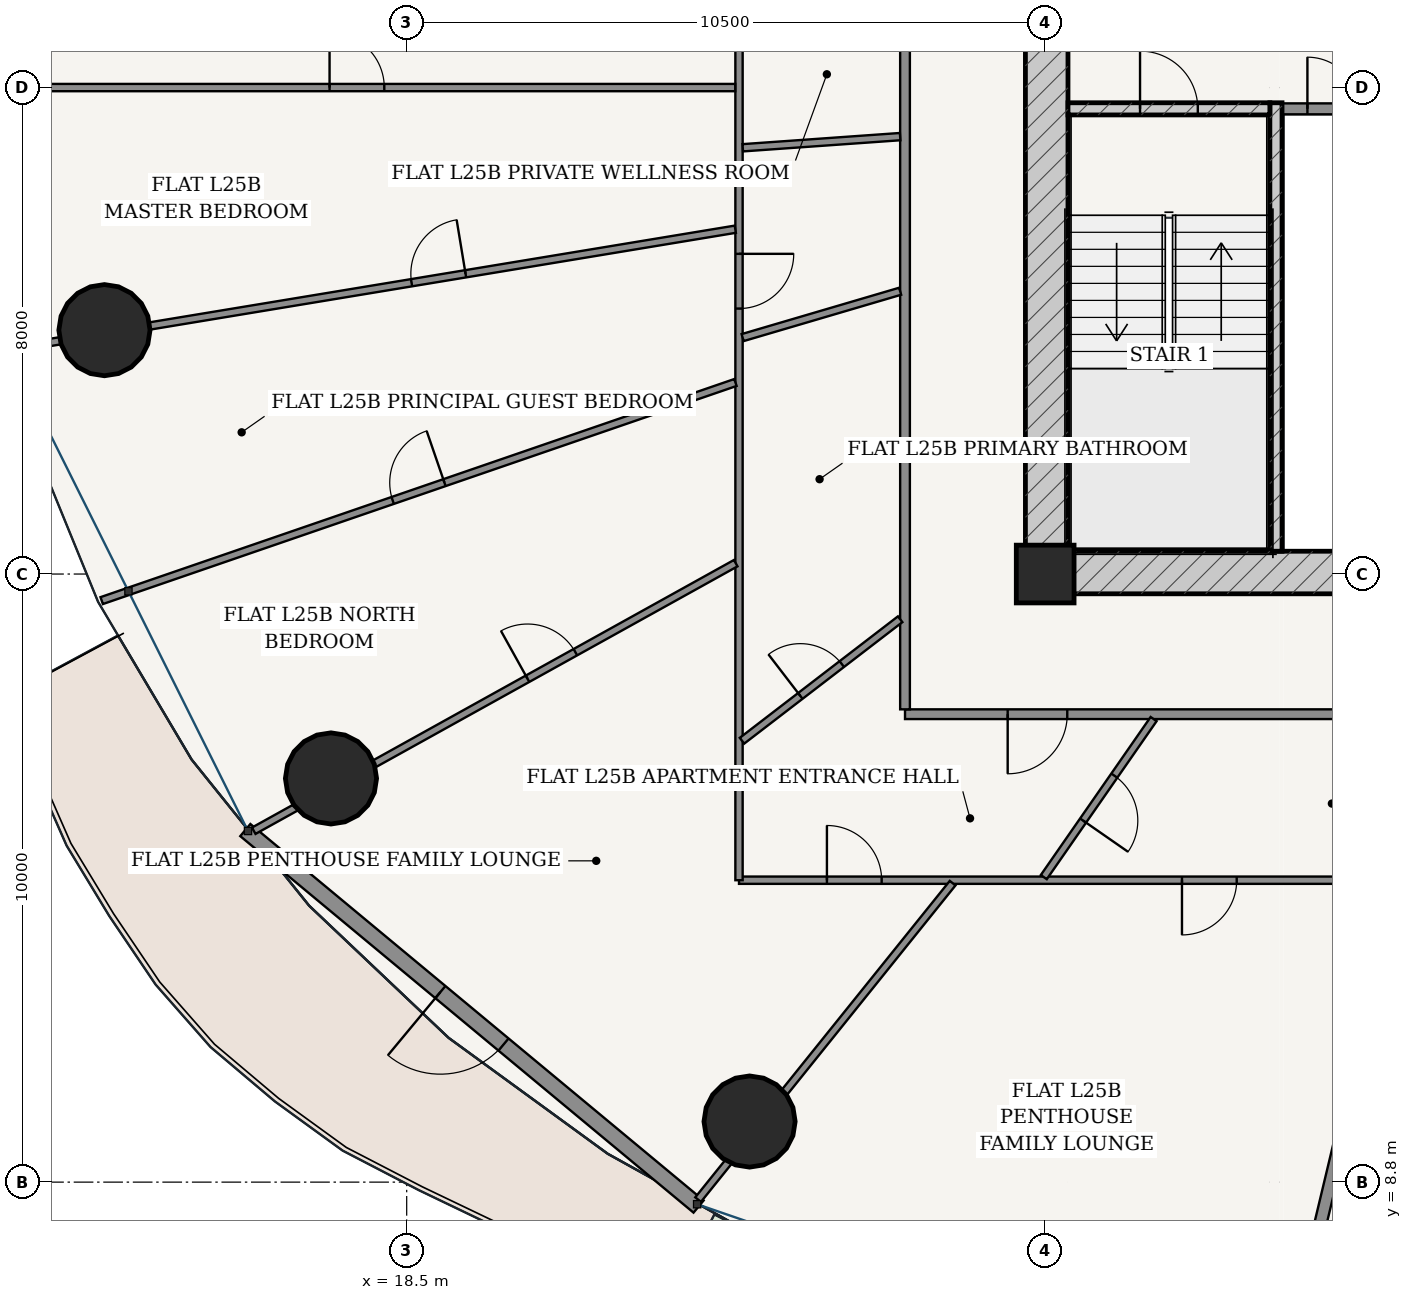
"""IFC4 building model, lengths in metres.
Left out: names, types, materials, properties, quantities, classifications, styles, units other than length and angle.
Written with IfcOpenShell. Run it as: python <this file> out.ifc"""

import sys

from ifc_helpers import new_model, si_unit, direction, frame, frame_2d, origin, origin_2d, place, context, subcontext, project, spatial, rectangle, hollow_circle, extrude, source, transform, mapped, element, fill, save


model = new_model("IFC4")
c1 = context("Model", 3, precision=1e-05, world=origin(), true_north=direction((-0.2419218956, 0.970295726276)))
c2 = subcontext(c1, "Body", "Model", "MODEL_VIEW")
j1 = project(units=[si_unit("LENGTHUNIT", "METRE"), si_unit("PLANEANGLEUNIT", "RADIAN")], contexts=[c1])
p1 = place(None, origin())
s1 = spatial("IfcSite", under=j1, at=p1, CompositionType="ELEMENT")
p2 = place(p1, origin())
s2 = spatial("IfcBuilding", under=s1, at=p2, CompositionType="ELEMENT")
p3 = place(p2, frame((0.0, 0.0, 97.8)))
s3 = spatial("IfcBuildingStorey", under=s2, at=p3, CompositionType="ELEMENT", Elevation=97.8)
p4 = place(p3, frame((29.0, 18.8, 0.0), z_axis=(0.0, 0.0, 1.0), x_axis=(1.0, 0.0, 0.0)))
e1 = element("IfcColumn", 1, at=p4, inside=s3, PredefinedType="COLUMN", context=c2, shape_type="SweptSolid", body=[
    extrude(rectangle(XDim=0.95, YDim=0.95, at=origin_2d()), origin(), (0.0, 0.0, 1.0), 3.6),
])
p5 = place(p3, frame((28.675, 18.825, 0.0), z_axis=(0.0, 0.0, 1.0), x_axis=(1.0, 0.0, 0.0)))
e2 = element("IfcWall", 2, at=p5, inside=s3, PredefinedType="SHEAR", context=c2, shape_type="SweptSolid", body=[
    extrude(rectangle(XDim=18.65, YDim=0.7, at=frame_2d((9.325, 0.0))), origin(), (0.0, 0.0, 1.0), 3.325),
])
p6 = place(p5, frame((8.9, 0.0, 0.0)))
e3 = element("IfcOpeningElement", 3, at=p6, cuts=e2, PredefinedType="OPENING", context=c2, shape_type="SweptSolid", body=[
    extrude(rectangle(XDim=0.85, YDim=2.1, at=frame_2d((0.425, 1.05))), frame((0.0, 0.36, 0.0), z_axis=(0.0, -1.0, 0.0), x_axis=(1.0, 0.0, 0.0)), (0.0, 0.0, 1.0), 0.72),
])
p7 = place(p3, frame((29.025, 19.175, 0.0), z_axis=(0.0, 0.0, 1.0), x_axis=(0.0, 1.0, 0.0)))
e4 = element("IfcWall", 4, at=p7, inside=s3, PredefinedType="SHEAR", context=c2, shape_type="SweptSolid", body=[
    extrude(rectangle(XDim=15.25, YDim=0.7, at=frame_2d((7.625, 0.0))), origin(), (0.0, 0.0, 1.0), 3.325),
])
p8 = place(p7, frame((9.875, 0.0, 0.0)))
e5 = element("IfcOpeningElement", 5, at=p8, cuts=e4, PredefinedType="OPENING", context=c2, shape_type="SweptSolid", body=[
    extrude(rectangle(XDim=1.5, YDim=2.2, at=frame_2d((0.75, 1.1))), frame((0.0, 0.36, 0.0), z_axis=(0.0, -1.0, 0.0), x_axis=(1.0, 0.0, 0.0)), (0.0, 0.0, 1.0), 0.72),
])
p9 = place(p3, frame((32.795, 19.175, 0.0), z_axis=(0.0, 0.0, 1.0), x_axis=(0.0, 1.0, 0.0)))
e6 = element("IfcWall", 6, at=p9, inside=s3, PredefinedType="SOLIDWALL", context=c2, shape_type="SweptSolid", body=[
    extrude(rectangle(XDim=7.375, YDim=0.2, at=frame_2d((3.688, 0.0))), origin(), (0.0, 0.0, 1.0), 3.325),
])
p10 = place(p3, frame((29.375, 26.45, 0.0), z_axis=(0.0, 0.0, 1.0), x_axis=(1.0, 0.0, 0.0)))
e7 = element("IfcWall", 7, at=p10, inside=s3, PredefinedType="SOLIDWALL", context=c2, shape_type="SweptSolid", body=[
    extrude(rectangle(XDim=3.32, YDim=0.2, at=frame_2d((1.66, 0.0))), origin(), (0.0, 0.0, 1.0), 3.325),
])
p11 = place(p10, frame((1.185, 0.0, 0.0)))
e8 = element("IfcOpeningElement", 8, at=p11, cuts=e7, PredefinedType="OPENING", context=c2, shape_type="SweptSolid", body=[
    extrude(rectangle(XDim=0.95, YDim=2.15, at=frame_2d((0.475, 1.075))), frame((0.0, 0.11, 0.0), z_axis=(0.0, -1.0, 0.0), x_axis=(1.0, 0.0, 0.0)), (0.0, 0.0, 1.0), 0.22),
])
for number, where, z_axis, x_axis in (
    (9, (13.529, 22.81, 0.0), (0.0, 0.0, 1.0), (1.0, 0.0, 0.0)),
    (10, (17.255, 15.438, 0.0), (0.0, 0.0, 1.0), (1.0, 0.0, 0.0)),
    (11, (24.138, 9.796, 0.0), (0.0, 0.0, 1.0), (1.0, 0.0, 0.0)),
):
    element("IfcColumn", number, at=place(p3, frame(where, z_axis=z_axis, x_axis=x_axis)), inside=s3, PredefinedType="COLUMN", context=c2, shape_type="SweptSolid", body=[
        extrude(hollow_circle(Radius=0.75, WallThickness=0.045, at=origin_2d()), origin(), (0.0, 0.0, 1.0), 3.6),
    ])
p12 = place(p3, frame((15.846, 14.59, 0.0), z_axis=(0.0, 0.0, 1.0), x_axis=(0.769254958887, -0.638941944333, 0.0)))
e12 = element("IfcWall", 12, at=p12, inside=s3, PredefinedType="SOLIDWALL", context=c2, shape_type="SweptSolid", body=[
    extrude(rectangle(XDim=9.69, YDim=0.26, at=frame_2d((4.845, 0.0))), origin(), (0.0, 0.0, 1.0), 3.325),
])
p13 = place(p12, frame((4.17, 0.0, 0.0)))
e13 = element("IfcOpeningElement", 13, at=p13, cuts=e12, PredefinedType="OPENING", context=c2, shape_type="SweptSolid", body=[
    extrude(rectangle(XDim=1.35, YDim=2.2, at=frame_2d((0.675, 1.1))), frame((0.0, 0.14, 0.0), z_axis=(0.0, -1.0, 0.0), x_axis=(1.0, 0.0, 0.0)), (0.0, 0.0, 1.0), 0.28),
])
p14 = place(p3, frame((32.9, 26.45, 0.0), z_axis=(0.0, 0.0, 1.0), x_axis=(1.0, 0.0, 0.0)))
e14 = element("IfcWall", 14, at=p14, inside=s3, PredefinedType="PARTITIONING", context=c2, shape_type="SweptSolid", body=[
    extrude(rectangle(XDim=1.675, YDim=0.18, at=frame_2d((0.837, 0.0))), origin(), (0.0, 0.0, 1.0), 3.325),
])
p15 = place(p14, frame((0.413, 0.0, 0.0)))
e15 = element("IfcOpeningElement", 15, at=p15, cuts=e14, PredefinedType="OPENING", context=c2, shape_type="SweptSolid", body=[
    extrude(rectangle(XDim=0.85, YDim=2.1, at=frame_2d((0.425, 1.05))), frame((0.0, 0.1, 0.0), z_axis=(0.0, -1.0, 0.0), x_axis=(1.0, 0.0, 0.0)), (0.0, 0.0, 1.0), 0.2),
])
p16 = place(p3, frame((26.695, 16.495, 0.0), z_axis=(0.0, 0.0, 1.0), x_axis=(1.0, 0.0, 0.0)))
e16 = element("IfcWall", 16, at=p16, inside=s3, PredefinedType="PARTITIONING", context=c2, shape_type="SweptSolid", body=[
    extrude(rectangle(XDim=22.61, YDim=0.16, at=frame_2d((11.305, 0.0))), origin(), (0.0, 0.0, 1.0), 2.767),
])
p17 = place(p16, frame((1.688, 0.0, 0.0)))
e17 = element("IfcOpeningElement", 17, at=p17, cuts=e16, PredefinedType="OPENING", context=c2, shape_type="SweptSolid", body=[
    extrude(rectangle(XDim=0.98, YDim=2.2, at=frame_2d((0.49, 1.1))), frame((0.0, 0.09, 0.0), z_axis=(0.0, -1.0, 0.0), x_axis=(1.0, 0.0, 0.0)), (0.0, 0.0, 1.0), 0.18),
])
p18 = place(p16, frame((16.137, 0.0, 0.0)))
e18 = element("IfcOpeningElement", 18, at=p18, cuts=e16, PredefinedType="OPENING", context=c2, shape_type="SweptSolid", body=[
    extrude(rectangle(XDim=0.98, YDim=2.2, at=frame_2d((0.49, 1.1))), frame((0.0, 0.09, 0.0), z_axis=(0.0, -1.0, 0.0), x_axis=(1.0, 0.0, 0.0)), (0.0, 0.0, 1.0), 0.18),
])
p19 = place(p3, frame((26.695, 16.575, 0.0), z_axis=(0.0, 0.0, 1.0), x_axis=(0.0, 1.0, 0.0)))
e19 = element("IfcWall", 19, at=p19, inside=s3, PredefinedType="PARTITIONING", context=c2, shape_type="SweptSolid", body=[
    extrude(rectangle(XDim=20.45, YDim=0.16, at=frame_2d((10.225, 0.0))), origin(), (0.0, 0.0, 1.0), 2.767),
])
p20 = place(p3, frame((34.777, 13.765, 0.0), z_axis=(0.0, 0.0, 1.0), x_axis=(-1.0, 0.0, 0.0)))
e20 = element("IfcWall", 20, at=p20, inside=s3, PredefinedType="PARTITIONING", context=c2, shape_type="SweptSolid", body=[
    extrude(rectangle(XDim=10.812, YDim=0.12, at=frame_2d((5.406, 0.0))), origin(), (0.0, 0.0, 1.0), 2.767),
])
p21 = place(p20, frame((8.466, 0.0, 0.0)))
e21 = element("IfcOpeningElement", 21, at=p21, cuts=e20, PredefinedType="OPENING", context=c2, shape_type="SweptSolid", body=[
    extrude(rectangle(XDim=0.9, YDim=2.15, at=frame_2d((0.45, 1.075))), frame((0.0, 0.07, 0.0), z_axis=(0.0, -1.0, 0.0), x_axis=(1.0, 0.0, 0.0)), (0.0, 0.0, 1.0), 0.14),
])
p22 = place(p20, frame((2.628, 0.0, 0.0)))
e22 = element("IfcOpeningElement", 22, at=p22, cuts=e20, PredefinedType="OPENING", context=c2, shape_type="SweptSolid", body=[
    extrude(rectangle(XDim=0.9, YDim=2.15, at=frame_2d((0.45, 1.075))), frame((0.0, 0.07, 0.0), z_axis=(0.0, -1.0, 0.0), x_axis=(1.0, 0.0, 0.0)), (0.0, 0.0, 1.0), 0.14),
])
p23 = place(p3, frame((23.965, 13.765, 0.0), z_axis=(0.0, 0.0, 1.0), x_axis=(0.0, 1.0, 0.0)))
e23 = element("IfcWall", 23, at=p23, inside=s3, PredefinedType="PARTITIONING", context=c2, shape_type="SweptSolid", body=[
    extrude(rectangle(XDim=20.725, YDim=0.12, at=frame_2d((10.362, 0.0))), origin(), (0.0, 0.0, 1.0), 2.767),
])
p24 = place(p23, frame((9.401, 0.0, 0.0)))
e24 = element("IfcOpeningElement", 24, at=p24, cuts=e23, PredefinedType="OPENING", context=c2, shape_type="SweptSolid", body=[
    extrude(rectangle(XDim=0.9, YDim=2.15, at=frame_2d((0.45, 1.075))), frame((0.0, 0.07, 0.0), z_axis=(0.0, -1.0, 0.0), x_axis=(1.0, 0.0, 0.0)), (0.0, 0.0, 1.0), 0.14),
])
p25 = place(p23, frame((18.157, 0.0, 0.0)))
e25 = element("IfcOpeningElement", 25, at=p25, cuts=e23, PredefinedType="OPENING", context=c2, shape_type="SweptSolid", body=[
    extrude(rectangle(XDim=0.86, YDim=2.15, at=frame_2d((0.43, 1.075))), frame((0.0, 0.07, 0.0), z_axis=(0.0, -1.0, 0.0), x_axis=(1.0, 0.0, 0.0)), (0.0, 0.0, 1.0), 0.14),
])
p26 = place(p23, frame((14.376, 0.0, 0.0)))
e26 = element("IfcOpeningElement", 26, at=p26, cuts=e23, PredefinedType="OPENING", context=c2, shape_type="SweptSolid", body=[
    extrude(rectangle(XDim=0.9, YDim=2.15, at=frame_2d((0.45, 1.075))), frame((0.0, 0.07, 0.0), z_axis=(0.0, -1.0, 0.0), x_axis=(1.0, 0.0, 0.0)), (0.0, 0.0, 1.0), 0.14),
])
p27 = place(p3, frame((23.903, 26.8, 0.0), z_axis=(0.0, 0.0, 1.0), x_axis=(-1.0, 0.0, 0.0)))
e27 = element("IfcWall", 27, at=p27, inside=s3, PredefinedType="PARTITIONING", context=c2, shape_type="SweptSolid", body=[
    extrude(rectangle(XDim=12.443, YDim=0.12, at=frame_2d((6.222, 0.0))), origin(), (0.0, 0.0, 1.0), 2.767),
])
p28 = place(p27, frame((5.771, 0.0, 0.0)))
e28 = element("IfcOpeningElement", 28, at=p28, cuts=e27, PredefinedType="OPENING", context=c2, shape_type="SweptSolid", body=[
    extrude(rectangle(XDim=0.9, YDim=2.15, at=frame_2d((0.45, 1.075))), frame((0.0, 0.07, 0.0), z_axis=(0.0, -1.0, 0.0), x_axis=(1.0, 0.0, 0.0)), (0.0, 0.0, 1.0), 0.14),
])
p29 = place(p3, frame((23.904, 24.47, 0.0), z_axis=(0.0, 0.0, 1.0), x_axis=(-0.986618264768, -0.163047231274, 0.0)))
e29 = element("IfcWall", 29, at=p29, inside=s3, PredefinedType="PARTITIONING", context=c2, shape_type="SweptSolid", body=[
    extrude(rectangle(XDim=12.039, YDim=0.12, at=frame_2d((6.02, 0.0))), origin(), (0.0, 0.0, 1.0), 2.767),
])
p30 = place(p29, frame((4.496, 0.0, 0.0)))
e30 = element("IfcOpeningElement", 30, at=p30, cuts=e29, PredefinedType="OPENING", context=c2, shape_type="SweptSolid", body=[
    extrude(rectangle(XDim=0.9, YDim=2.15, at=frame_2d((0.45, 1.075))), frame((0.0, 0.07, 0.0), z_axis=(0.0, -1.0, 0.0), x_axis=(1.0, 0.0, 0.0)), (0.0, 0.0, 1.0), 0.14),
])
p31 = place(p3, frame((23.906, 21.95, 0.0), z_axis=(0.0, 0.0, 1.0), x_axis=(-0.945573120726, -0.32540970078, 0.0)))
e31 = element("IfcWall", 31, at=p31, inside=s3, PredefinedType="PARTITIONING", context=c2, shape_type="SweptSolid", body=[
    extrude(rectangle(XDim=11.022, YDim=0.12, at=frame_2d((5.511, 0.0))), origin(), (0.0, 0.0, 1.0), 2.767),
])
p32 = place(p31, frame((5.061, 0.0, 0.0)))
e32 = element("IfcOpeningElement", 32, at=p32, cuts=e31, PredefinedType="OPENING", context=c2, shape_type="SweptSolid", body=[
    extrude(rectangle(XDim=0.9, YDim=2.15, at=frame_2d((0.45, 1.075))), frame((0.0, 0.07, 0.0), z_axis=(0.0, -1.0, 0.0), x_axis=(1.0, 0.0, 0.0)), (0.0, 0.0, 1.0), 0.14),
])
p33 = place(p3, frame((23.911, 18.979, 0.0), z_axis=(0.0, 0.0, 1.0), x_axis=(-0.874313476423, -0.485361664066, 0.0)))
e33 = element("IfcWall", 33, at=p33, inside=s3, PredefinedType="PARTITIONING", context=c2, shape_type="SweptSolid", body=[
    extrude(rectangle(XDim=9.066, YDim=0.12, at=frame_2d((4.533, 0.0))), origin(), (0.0, 0.0, 1.0), 2.767),
])
p34 = place(p33, frame((3.016, 0.0, 0.0)))
e34 = element("IfcOpeningElement", 34, at=p34, cuts=e33, PredefinedType="OPENING", context=c2, shape_type="SweptSolid", body=[
    extrude(rectangle(XDim=0.9, YDim=2.15, at=frame_2d((0.45, 1.075))), frame((0.0, 0.07, 0.0), z_axis=(0.0, -1.0, 0.0), x_axis=(1.0, 0.0, 0.0)), (0.0, 0.0, 1.0), 0.14),
])
p35 = place(p3, frame((27.478, 13.717, 0.0), z_axis=(0.0, 0.0, 1.0), x_axis=(-0.626707979732, -0.77925419995, 0.0)))
e35 = element("IfcWall", 35, at=p35, inside=s3, PredefinedType="PARTITIONING", context=c2, shape_type="SweptSolid", body=[
    extrude(rectangle(XDim=6.679, YDim=0.12, at=frame_2d((3.339, 0.0))), origin(), (0.0, 0.0, 1.0), 2.767),
])
p36 = place(p3, frame((26.615, 25.993, 0.0), z_axis=(0.0, 0.0, 1.0), x_axis=(-0.997500084777, -0.070665273433, 0.0)))
e36 = element("IfcWall", 36, at=p36, inside=s3, PredefinedType="PARTITIONING", context=c2, shape_type="SweptSolid", body=[
    extrude(rectangle(XDim=2.595, YDim=0.12, at=frame_2d((1.297, 0.0))), origin(), (0.0, 0.0, 1.0), 3.325),
])
p37 = place(p3, frame((26.615, 23.45, 0.0), z_axis=(0.0, 0.0, 1.0), x_axis=(-0.959338143787, -0.282259323806, 0.0)))
e37 = element("IfcWall", 37, at=p37, inside=s3, PredefinedType="PARTITIONING", context=c2, shape_type="SweptSolid", body=[
    extrude(rectangle(XDim=2.7, YDim=0.12, at=frame_2d((1.35, 0.0))), origin(), (0.0, 0.0, 1.0), 3.325),
])
p38 = place(p3, frame((26.615, 18.056, 0.0), z_axis=(0.0, 0.0, 1.0), x_axis=(-0.79311360735, -0.609073727751, 0.0)))
e38 = element("IfcWall", 38, at=p38, inside=s3, PredefinedType="PARTITIONING", context=c2, shape_type="SweptSolid", body=[
    extrude(rectangle(XDim=3.279, YDim=0.12, at=frame_2d((1.64, 0.0))), origin(), (0.0, 0.0, 1.0), 3.004),
])
p39 = place(p38, frame((1.21, 0.0, 0.0)))
e39 = element("IfcOpeningElement", 39, at=p39, cuts=e38, PredefinedType="OPENING", context=c2, shape_type="SweptSolid", body=[
    extrude(rectangle(XDim=0.86, YDim=2.15, at=frame_2d((0.43, 1.075))), frame((0.0, 0.07, 0.0), z_axis=(0.0, -1.0, 0.0), x_axis=(1.0, 0.0, 0.0)), (0.0, 0.0, 1.0), 0.14),
])
p40 = place(p3, frame((30.783, 16.415, 0.0), z_axis=(0.0, 0.0, 1.0), x_axis=(-0.570653089326, -0.821191239385, 0.0)))
e40 = element("IfcWall", 40, at=p40, inside=s3, PredefinedType="PARTITIONING", context=c2, shape_type="SweptSolid", body=[
    extrude(rectangle(XDim=3.165, YDim=0.12, at=frame_2d((1.583, 0.0))), origin(), (0.0, 0.0, 1.0), 3.004),
])
p41 = place(p40, frame((1.133, 0.0, 0.0)))
e41 = element("IfcOpeningElement", 41, at=p41, cuts=e40, PredefinedType="OPENING", context=c2, shape_type="SweptSolid", body=[
    extrude(rectangle(XDim=0.9, YDim=2.15, at=frame_2d((0.45, 1.075))), frame((0.0, 0.07, 0.0), z_axis=(0.0, -1.0, 0.0), x_axis=(1.0, 0.0, 0.0)), (0.0, 0.0, 1.0), 0.14),
])
p42 = place(p3, frame((35.514, 16.415, 0.0), z_axis=(0.0, 0.0, 1.0), x_axis=(-0.232829417917, -0.972517589636, 0.0)))
e42 = element("IfcWall", 42, at=p42, inside=s3, PredefinedType="PARTITIONING", context=c2, shape_type="SweptSolid", body=[
    extrude(rectangle(XDim=11.502, YDim=0.2, at=frame_2d((5.751, 0.0))), origin(), (0.0, 0.0, 1.0), 2.767),
])
m1 = source(origin(), c2, "Body", "SweptSolid", [
    extrude(rectangle(XDim=1.35, YDim=2.2, at=frame_2d((0.675, 1.1))), frame((0.0, 0.025, 0.0), z_axis=(0.0, -1.0, 0.0), x_axis=(1.0, 0.0, 0.0)), (0.0, 0.0, 1.0), 0.05),
])
p43 = place(p13, frame((1.35, 0.0, 0.0), z_axis=(0.0, 0.0, 1.0), x_axis=(-1.0, 0.0, 0.0)))
e43 = element("IfcDoor", 43, at=p43, inside=s3, OperationType="SINGLE_SWING_RIGHT", PredefinedType="DOOR", context=c2, shape_type="MappedRepresentation", body=[
    mapped(m1, transform((0.0, 0.0, 0.0), scale=1.0)),
])
fill(e13, e43)
m2 = source(origin(), c2, "Body", "SweptSolid", [
    extrude(rectangle(XDim=0.95, YDim=2.15, at=frame_2d((0.475, 1.075))), frame((0.0, 0.025, 0.0), z_axis=(0.0, -1.0, 0.0), x_axis=(1.0, 0.0, 0.0)), (0.0, 0.0, 1.0), 0.05),
])
p44 = place(p11, origin())
e44 = element("IfcDoor", 44, at=p44, inside=s3, OperationType="SINGLE_SWING_LEFT", PredefinedType="DOOR", context=c2, shape_type="MappedRepresentation", body=[
    mapped(m2, transform((0.0, 0.0, 0.0), scale=1.0)),
])
fill(e8, e44)
m3 = source(origin(), c2, "Body", "SweptSolid", [
    extrude(rectangle(XDim=0.85, YDim=2.1, at=frame_2d((0.425, 1.05))), frame((0.0, 0.025, 0.0), z_axis=(0.0, -1.0, 0.0), x_axis=(1.0, 0.0, 0.0)), (0.0, 0.0, 1.0), 0.05),
])
p45 = place(p15, origin())
e45 = element("IfcDoor", 45, at=p45, inside=s3, OperationType="SINGLE_SWING_LEFT", PredefinedType="DOOR", context=c2, shape_type="MappedRepresentation", body=[
    mapped(m3, transform((0.0, 0.0, 0.0), scale=1.0)),
])
fill(e15, e45)
m4 = source(origin(), c2, "Body", "SweptSolid", [
    extrude(rectangle(XDim=0.98, YDim=2.2, at=frame_2d((0.49, 1.1))), frame((0.0, 0.025, 0.0), z_axis=(0.0, -1.0, 0.0), x_axis=(1.0, 0.0, 0.0)), (0.0, 0.0, 1.0), 0.05),
])
p46 = place(p17, frame((0.98, 0.0, 0.0), z_axis=(0.0, 0.0, 1.0), x_axis=(-1.0, 0.0, 0.0)))
e46 = element("IfcDoor", 46, at=p46, inside=s3, OperationType="SINGLE_SWING_RIGHT", PredefinedType="DOOR", context=c2, shape_type="MappedRepresentation", body=[
    mapped(m4, transform((0.0, 0.0, 0.0), scale=1.0)),
])
fill(e17, e46)
m5 = source(origin(), c2, "Body", "SweptSolid", [
    extrude(rectangle(XDim=0.86, YDim=2.15, at=frame_2d((0.43, 1.075))), frame((0.0, 0.025, 0.0), z_axis=(0.0, -1.0, 0.0), x_axis=(1.0, 0.0, 0.0)), (0.0, 0.0, 1.0), 0.05),
])
p47 = place(p39, frame((0.86, 0.0, 0.0), z_axis=(0.0, 0.0, 1.0), x_axis=(-1.0, 0.0, 0.0)))
e47 = element("IfcDoor", 47, at=p47, inside=s3, OperationType="SINGLE_SWING_LEFT", PredefinedType="DOOR", context=c2, shape_type="MappedRepresentation", body=[
    mapped(m5, transform((0.0, 0.0, 0.0), scale=1.0)),
])
fill(e39, e47)
m6 = source(origin(), c2, "Body", "SweptSolid", [
    extrude(rectangle(XDim=0.9, YDim=2.15, at=frame_2d((0.45, 1.075))), frame((0.0, 0.025, 0.0), z_axis=(0.0, -1.0, 0.0), x_axis=(1.0, 0.0, 0.0)), (0.0, 0.0, 1.0), 0.05),
])
p48 = place(p41, origin())
e48 = element("IfcDoor", 48, at=p48, inside=s3, OperationType="SINGLE_SWING_RIGHT", PredefinedType="DOOR", context=c2, shape_type="MappedRepresentation", body=[
    mapped(m6, transform((0.0, 0.0, 0.0), scale=1.0)),
])
fill(e41, e48)
p49 = place(p21, frame((0.9, 0.0, 0.0), z_axis=(0.0, 0.0, 1.0), x_axis=(-1.0, 0.0, 0.0)))
e49 = element("IfcDoor", 49, at=p49, inside=s3, OperationType="SINGLE_SWING_LEFT", PredefinedType="DOOR", context=c2, shape_type="MappedRepresentation", body=[
    mapped(m6, transform((0.0, 0.0, 0.0), scale=1.0)),
])
fill(e21, e49)
p50 = place(p22, origin())
e50 = element("IfcDoor", 50, at=p50, inside=s3, OperationType="SINGLE_SWING_RIGHT", PredefinedType="DOOR", context=c2, shape_type="MappedRepresentation", body=[
    mapped(m6, transform((0.0, 0.0, 0.0), scale=1.0)),
])
fill(e22, e50)
p51 = place(p34, frame((0.9, 0.0, 0.0), z_axis=(0.0, 0.0, 1.0), x_axis=(-1.0, 0.0, 0.0)))
e51 = element("IfcDoor", 51, at=p51, inside=s3, OperationType="SINGLE_SWING_LEFT", PredefinedType="DOOR", context=c2, shape_type="MappedRepresentation", body=[
    mapped(m6, transform((0.0, 0.0, 0.0), scale=1.0)),
])
fill(e34, e51)
p52 = place(p32, frame((0.9, 0.0, 0.0), z_axis=(0.0, 0.0, 1.0), x_axis=(-1.0, 0.0, 0.0)))
e52 = element("IfcDoor", 52, at=p52, inside=s3, OperationType="SINGLE_SWING_RIGHT", PredefinedType="DOOR", context=c2, shape_type="MappedRepresentation", body=[
    mapped(m6, transform((0.0, 0.0, 0.0), scale=1.0)),
])
fill(e32, e52)
p53 = place(p24, frame((0.9, 0.0, 0.0), z_axis=(0.0, 0.0, 1.0), x_axis=(-1.0, 0.0, 0.0)))
e53 = element("IfcDoor", 53, at=p53, inside=s3, OperationType="SINGLE_SWING_LEFT", PredefinedType="DOOR", context=c2, shape_type="MappedRepresentation", body=[
    mapped(m6, transform((0.0, 0.0, 0.0), scale=1.0)),
])
fill(e24, e53)
p54 = place(p30, frame((0.9, 0.0, 0.0), z_axis=(0.0, 0.0, 1.0), x_axis=(-1.0, 0.0, 0.0)))
e54 = element("IfcDoor", 54, at=p54, inside=s3, OperationType="SINGLE_SWING_RIGHT", PredefinedType="DOOR", context=c2, shape_type="MappedRepresentation", body=[
    mapped(m6, transform((0.0, 0.0, 0.0), scale=1.0)),
])
fill(e30, e54)
p55 = place(p28, frame((0.9, 0.0, 0.0), z_axis=(0.0, 0.0, 1.0), x_axis=(-1.0, 0.0, 0.0)))
e55 = element("IfcDoor", 55, at=p55, inside=s3, OperationType="SINGLE_SWING_LEFT", PredefinedType="DOOR", context=c2, shape_type="MappedRepresentation", body=[
    mapped(m6, transform((0.0, 0.0, 0.0), scale=1.0)),
])
fill(e28, e55)
save(model, sys.argv[1])
